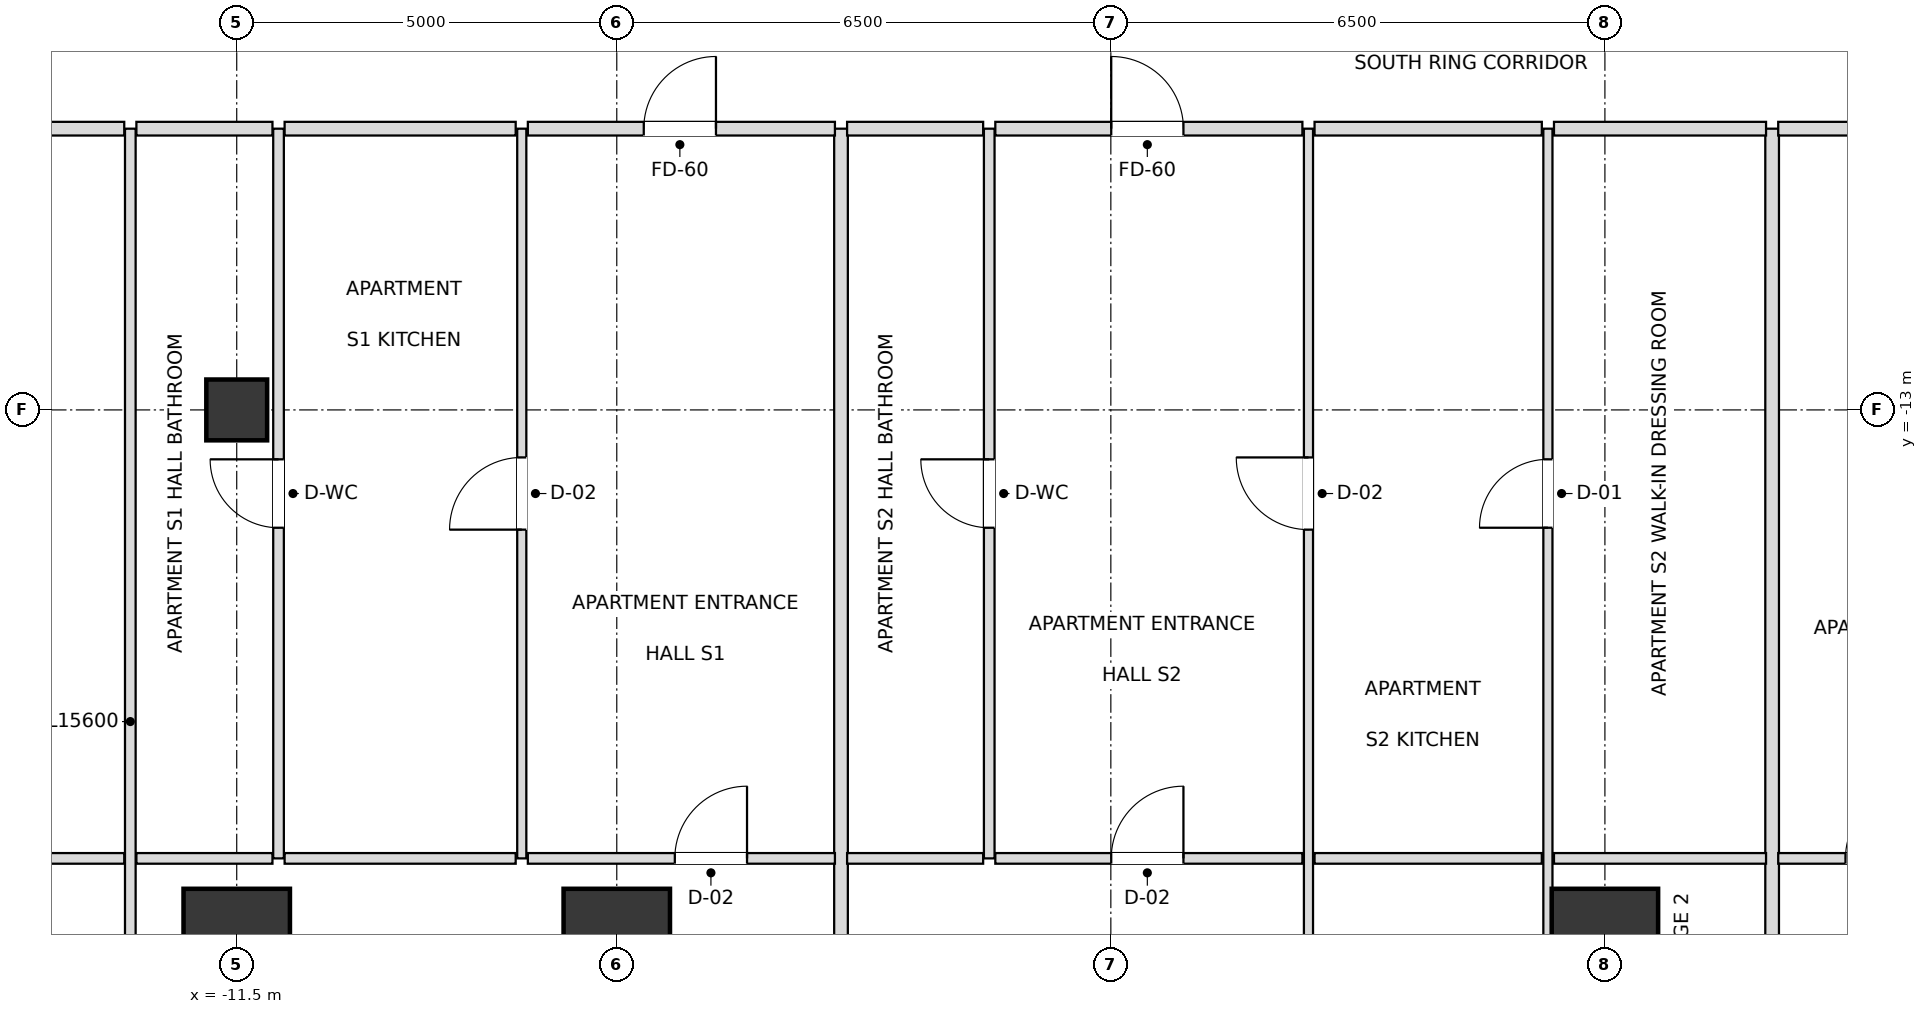
"""IFC4 building model, lengths in metres.
Left out: names, types, materials, properties, quantities, classifications, styles, units other than length and angle.
Written with IfcOpenShell. Run it as: python <this file> out.ifc"""

import sys

from ifc_helpers import new_model, si_unit, direction, frame, frame_2d, origin, origin_2d, place, context, subcontext, project, spatial, rectangle, extrude, element, fill, save


model = new_model("IFC4")
c1 = context("Model", 3, precision=1e-05, world=origin(), true_north=direction((0.0, 1.0)))
c2 = subcontext(c1, "Body", "Model", "MODEL_VIEW")
j1 = project(units=[si_unit("LENGTHUNIT", "METRE"), si_unit("PLANEANGLEUNIT", "RADIAN")], contexts=[c1])
p1 = place(None, origin())
s1 = spatial("IfcSite", under=j1, at=p1, CompositionType="ELEMENT")
p2 = place(p1, origin())
s2 = spatial("IfcBuilding", under=s1, at=p2, CompositionType="ELEMENT")
p3 = place(p2, frame((0.0, 0.0, 46.8)))
s3 = spatial("IfcBuildingStorey", under=s2, at=p3, CompositionType="ELEMENT", Elevation=46.8)
for number, where, z_axis, x_axis in (
    (1, (-11.5, -20.0, 0.0), (0.0, 0.0, 1.0), (1.0, 0.0, 0.0)),
    (2, (-6.5, -20.0, 0.0), (0.0, 0.0, 1.0), (1.0, 0.0, 0.0)),
    (3, (6.5, -20.0, 0.0), (0.0, 0.0, 1.0), (1.0, 0.0, 0.0)),
):
    element("IfcColumn", number, at=place(p3, frame(where, z_axis=z_axis, x_axis=x_axis)), inside=s3, PredefinedType="USERDEFINED", context=c2, shape_type="SweptSolid", body=[
        extrude(rectangle(XDim=1.4, YDim=1.4, at=origin_2d()), origin(), (0.0, 0.0, 1.0), 3.6),
    ])
p4 = place(p3, frame((-11.5, -13.0, 0.0), z_axis=(0.0, 0.0, 1.0), x_axis=(1.0, 0.0, 0.0)))
e4 = element("IfcColumn", 4, at=p4, inside=s3, PredefinedType="COLUMN", context=c2, shape_type="SweptSolid", body=[
    extrude(rectangle(XDim=0.8, YDim=0.8, at=origin_2d()), origin(), (0.0, 0.0, 1.0), 3.6),
])
p5 = place(p3, frame((-12.9, -24.9, 0.0), z_axis=(0.0, 0.0, 1.0), x_axis=(0.0, 1.0, 0.0)))
e5 = element("IfcWall", 5, at=p5, inside=s3, PredefinedType="PARTITIONING", context=c2, shape_type="SweptSolid", body=[
    extrude(rectangle(XDim=15.6, YDim=0.14, at=frame_2d((7.8, 0.0))), origin(), (0.0, 0.0, 1.0), 2.736),
])
p6 = place(p5, frame((2.55, 0.0, 0.0)))
e6 = element("IfcOpeningElement", 6, at=p6, cuts=e5, PredefinedType="OPENING", context=c2, shape_type="SweptSolid", body=[
    extrude(rectangle(XDim=0.9, YDim=2.1, at=frame_2d((0.45, 1.05))), frame((0.0, 0.08, 0.0), z_axis=(0.0, -1.0, 0.0), x_axis=(1.0, 0.0, 0.0)), (0.0, 0.0, 1.0), 0.16),
])
p7 = place(p3, frame((-10.95, -18.9, 0.0), z_axis=(0.0, 0.0, 1.0), x_axis=(0.0, 1.0, 0.0)))
e7 = element("IfcWall", 7, at=p7, inside=s3, PredefinedType="PARTITIONING", context=c2, shape_type="SweptSolid", body=[
    extrude(rectangle(XDim=9.6, YDim=0.14, at=frame_2d((4.8, 0.0))), origin(), (0.0, 0.0, 1.0), 2.816),
])
p8 = place(p7, frame((4.35, 0.0, 0.0)))
e8 = element("IfcOpeningElement", 8, at=p8, cuts=e7, PredefinedType="OPENING", context=c2, shape_type="SweptSolid", body=[
    extrude(rectangle(XDim=0.9, YDim=2.1, at=frame_2d((0.45, 1.05))), frame((0.0, 0.08, 0.0), z_axis=(0.0, -1.0, 0.0), x_axis=(1.0, 0.0, 0.0)), (0.0, 0.0, 1.0), 0.16),
])
p9 = place(p3, frame((-7.75, -18.9, 0.0), z_axis=(0.0, 0.0, 1.0), x_axis=(0.0, 1.0, 0.0)))
e9 = element("IfcWall", 9, at=p9, inside=s3, PredefinedType="PARTITIONING", context=c2, shape_type="SweptSolid", body=[
    extrude(rectangle(XDim=9.6, YDim=0.12, at=frame_2d((4.8, 0.0))), origin(), (0.0, 0.0, 1.0), 2.816),
])
p10 = place(p9, frame((4.325, 0.0, 0.0)))
e10 = element("IfcOpeningElement", 10, at=p10, cuts=e9, PredefinedType="OPENING", context=c2, shape_type="SweptSolid", body=[
    extrude(rectangle(XDim=0.95, YDim=2.1, at=frame_2d((0.475, 1.05))), frame((0.0, 0.07, 0.0), z_axis=(0.0, -1.0, 0.0), x_axis=(1.0, 0.0, 0.0)), (0.0, 0.0, 1.0), 0.14),
])
p11 = place(p3, frame((-3.55, -24.9, 0.0), z_axis=(0.0, 0.0, 1.0), x_axis=(0.0, 1.0, 0.0)))
e11 = element("IfcWall", 11, at=p11, inside=s3, PredefinedType="PARTITIONING", context=c2, shape_type="SweptSolid", body=[
    extrude(rectangle(XDim=15.6, YDim=0.18, at=frame_2d((7.8, 0.0))), origin(), (0.0, 0.0, 1.0), 2.816),
])
p12 = place(p3, frame((-1.6, -18.9, 0.0), z_axis=(0.0, 0.0, 1.0), x_axis=(0.0, 1.0, 0.0)))
e12 = element("IfcWall", 12, at=p12, inside=s3, PredefinedType="PARTITIONING", context=c2, shape_type="SweptSolid", body=[
    extrude(rectangle(XDim=9.6, YDim=0.14, at=frame_2d((4.8, 0.0))), origin(), (0.0, 0.0, 1.0), 2.948),
])
p13 = place(p12, frame((4.35, 0.0, 0.0)))
e13 = element("IfcOpeningElement", 13, at=p13, cuts=e12, PredefinedType="OPENING", context=c2, shape_type="SweptSolid", body=[
    extrude(rectangle(XDim=0.9, YDim=2.1, at=frame_2d((0.45, 1.05))), frame((0.0, 0.08, 0.0), z_axis=(0.0, -1.0, 0.0), x_axis=(1.0, 0.0, 0.0)), (0.0, 0.0, 1.0), 0.16),
])
p14 = place(p3, frame((2.6, -24.9, 0.0), z_axis=(0.0, 0.0, 1.0), x_axis=(0.0, 1.0, 0.0)))
e14 = element("IfcWall", 14, at=p14, inside=s3, PredefinedType="PARTITIONING", context=c2, shape_type="SweptSolid", body=[
    extrude(rectangle(XDim=15.6, YDim=0.12, at=frame_2d((7.8, 0.0))), origin(), (0.0, 0.0, 1.0), 2.816),
])
p15 = place(p14, frame((10.325, 0.0, 0.0)))
e15 = element("IfcOpeningElement", 15, at=p15, cuts=e14, PredefinedType="OPENING", context=c2, shape_type="SweptSolid", body=[
    extrude(rectangle(XDim=0.95, YDim=2.1, at=frame_2d((0.475, 1.05))), frame((0.0, 0.07, 0.0), z_axis=(0.0, -1.0, 0.0), x_axis=(1.0, 0.0, 0.0)), (0.0, 0.0, 1.0), 0.14),
])
p16 = place(p14, frame((2.55, 0.0, 0.0)))
e16 = element("IfcOpeningElement", 16, at=p16, cuts=e14, PredefinedType="OPENING", context=c2, shape_type="SweptSolid", body=[
    extrude(rectangle(XDim=0.9, YDim=2.1, at=frame_2d((0.45, 1.05))), frame((0.0, 0.07, 0.0), z_axis=(0.0, -1.0, 0.0), x_axis=(1.0, 0.0, 0.0)), (0.0, 0.0, 1.0), 0.14),
])
p17 = place(p3, frame((5.75, -24.9, 0.0), z_axis=(0.0, 0.0, 1.0), x_axis=(0.0, 1.0, 0.0)))
e17 = element("IfcWall", 17, at=p17, inside=s3, PredefinedType="PARTITIONING", context=c2, shape_type="SweptSolid", body=[
    extrude(rectangle(XDim=15.6, YDim=0.12, at=frame_2d((7.8, 0.0))), origin(), (0.0, 0.0, 1.0), 2.816),
])
p18 = place(p17, frame((10.35, 0.0, 0.0)))
e18 = element("IfcOpeningElement", 18, at=p18, cuts=e17, PredefinedType="OPENING", context=c2, shape_type="SweptSolid", body=[
    extrude(rectangle(XDim=0.9, YDim=2.1, at=frame_2d((0.45, 1.05))), frame((0.0, 0.07, 0.0), z_axis=(0.0, -1.0, 0.0), x_axis=(1.0, 0.0, 0.0)), (0.0, 0.0, 1.0), 0.14),
])
p19 = place(p17, frame((2.55, 0.0, 0.0)))
e19 = element("IfcOpeningElement", 19, at=p19, cuts=e17, PredefinedType="OPENING", context=c2, shape_type="SweptSolid", body=[
    extrude(rectangle(XDim=0.9, YDim=2.1, at=frame_2d((0.45, 1.05))), frame((0.0, 0.07, 0.0), z_axis=(0.0, -1.0, 0.0), x_axis=(1.0, 0.0, 0.0)), (0.0, 0.0, 1.0), 0.14),
])
p20 = place(p3, frame((8.7, -24.9, 0.0), z_axis=(0.0, 0.0, 1.0), x_axis=(0.0, 1.0, 0.0)))
e20 = element("IfcWall", 20, at=p20, inside=s3, PredefinedType="PARTITIONING", context=c2, shape_type="SweptSolid", body=[
    extrude(rectangle(XDim=15.6, YDim=0.18, at=frame_2d((7.8, 0.0))), origin(), (0.0, 0.0, 1.0), 2.816),
])
p21 = place(p3, frame((-18.32, -18.9, 0.0), z_axis=(0.0, 0.0, 1.0), x_axis=(1.0, 0.0, 0.0)))
e21 = element("IfcWall", 21, at=p21, inside=s3, PredefinedType="PARTITIONING", context=c2, shape_type="SweptSolid", body=[
    extrude(rectangle(XDim=5.34, YDim=0.14, at=frame_2d((2.67, 0.0))), origin(), (0.0, 0.0, 1.0), 2.736),
])
p22 = place(p21, frame((2.21, 0.0, 0.0)))
e22 = element("IfcOpeningElement", 22, at=p22, cuts=e21, PredefinedType="OPENING", context=c2, shape_type="SweptSolid", body=[
    extrude(rectangle(XDim=0.9, YDim=2.1, at=frame_2d((0.45, 1.05))), frame((0.0, 0.08, 0.0), z_axis=(0.0, -1.0, 0.0), x_axis=(1.0, 0.0, 0.0)), (0.0, 0.0, 1.0), 0.16),
])
p23 = place(p3, frame((-12.82, -18.9, 0.0), z_axis=(0.0, 0.0, 1.0), x_axis=(1.0, 0.0, 0.0)))
e23 = element("IfcWall", 23, at=p23, inside=s3, PredefinedType="PARTITIONING", context=c2, shape_type="SweptSolid", body=[
    extrude(rectangle(XDim=1.79, YDim=0.14, at=frame_2d((0.895, 0.0))), origin(), (0.0, 0.0, 1.0), 2.736),
])
p24 = place(p3, frame((-10.87, -18.9, 0.0), z_axis=(0.0, 0.0, 1.0), x_axis=(1.0, 0.0, 0.0)))
e24 = element("IfcWall", 24, at=p24, inside=s3, PredefinedType="PARTITIONING", context=c2, shape_type="SweptSolid", body=[
    extrude(rectangle(XDim=3.04, YDim=0.14, at=frame_2d((1.52, 0.0))), origin(), (0.0, 0.0, 1.0), 3.38),
])
p25 = place(p3, frame((-7.67, -18.9, 0.0), z_axis=(0.0, 0.0, 1.0), x_axis=(1.0, 0.0, 0.0)))
e25 = element("IfcWall", 25, at=p25, inside=s3, PredefinedType="PARTITIONING", context=c2, shape_type="SweptSolid", body=[
    extrude(rectangle(XDim=4.04, YDim=0.14, at=frame_2d((2.02, 0.0))), origin(), (0.0, 0.0, 1.0), 2.816),
])
p26 = place(p25, frame((1.934, 0.0, 0.0)))
e26 = element("IfcOpeningElement", 26, at=p26, cuts=e25, PredefinedType="OPENING", context=c2, shape_type="SweptSolid", body=[
    extrude(rectangle(XDim=0.95, YDim=2.1, at=frame_2d((0.475, 1.05))), frame((0.0, 0.08, 0.0), z_axis=(0.0, -1.0, 0.0), x_axis=(1.0, 0.0, 0.0)), (0.0, 0.0, 1.0), 0.16),
])
p27 = place(p3, frame((-3.47, -18.9, 0.0), z_axis=(0.0, 0.0, 1.0), x_axis=(1.0, 0.0, 0.0)))
e27 = element("IfcWall", 27, at=p27, inside=s3, PredefinedType="PARTITIONING", context=c2, shape_type="SweptSolid", body=[
    extrude(rectangle(XDim=1.79, YDim=0.14, at=frame_2d((0.895, 0.0))), origin(), (0.0, 0.0, 1.0), 3.38),
])
p28 = place(p3, frame((-1.52, -18.9, 0.0), z_axis=(0.0, 0.0, 1.0), x_axis=(1.0, 0.0, 0.0)))
e28 = element("IfcWall", 28, at=p28, inside=s3, PredefinedType="PARTITIONING", context=c2, shape_type="SweptSolid", body=[
    extrude(rectangle(XDim=4.04, YDim=0.14, at=frame_2d((2.02, 0.0))), origin(), (0.0, 0.0, 1.0), 3.38),
])
p29 = place(p28, frame((1.525, 0.0, 0.0)))
e29 = element("IfcOpeningElement", 29, at=p29, cuts=e28, PredefinedType="OPENING", context=c2, shape_type="SweptSolid", body=[
    extrude(rectangle(XDim=0.95, YDim=2.1, at=frame_2d((0.475, 1.05))), frame((0.0, 0.08, 0.0), z_axis=(0.0, -1.0, 0.0), x_axis=(1.0, 0.0, 0.0)), (0.0, 0.0, 1.0), 0.16),
])
p30 = place(p3, frame((2.68, -18.9, 0.0), z_axis=(0.0, 0.0, 1.0), x_axis=(1.0, 0.0, 0.0)))
e30 = element("IfcWall", 30, at=p30, inside=s3, PredefinedType="PARTITIONING", context=c2, shape_type="SweptSolid", body=[
    extrude(rectangle(XDim=2.99, YDim=0.14, at=frame_2d((1.495, 0.0))), origin(), (0.0, 0.0, 1.0), 3.38),
])
p31 = place(p3, frame((5.83, -18.9, 0.0), z_axis=(0.0, 0.0, 1.0), x_axis=(1.0, 0.0, 0.0)))
e31 = element("IfcWall", 31, at=p31, inside=s3, PredefinedType="PARTITIONING", context=c2, shape_type="SweptSolid", body=[
    extrude(rectangle(XDim=2.79, YDim=0.14, at=frame_2d((1.395, 0.0))), origin(), (0.0, 0.0, 1.0), 2.816),
])
p32 = place(p3, frame((8.78, -18.9, 0.0), z_axis=(0.0, 0.0, 1.0), x_axis=(1.0, 0.0, 0.0)))
e32 = element("IfcWall", 32, at=p32, inside=s3, PredefinedType="PARTITIONING", context=c2, shape_type="SweptSolid", body=[
    extrude(rectangle(XDim=3.74, YDim=0.14, at=frame_2d((1.87, 0.0))), origin(), (0.0, 0.0, 1.0), 2.736),
])
p33 = place(p32, frame((0.885, 0.0, 0.0)))
e33 = element("IfcOpeningElement", 33, at=p33, cuts=e32, PredefinedType="OPENING", context=c2, shape_type="SweptSolid", body=[
    extrude(rectangle(XDim=0.95, YDim=2.1, at=frame_2d((0.475, 1.05))), frame((0.0, 0.08, 0.0), z_axis=(0.0, -1.0, 0.0), x_axis=(1.0, 0.0, 0.0)), (0.0, 0.0, 1.0), 0.16),
])
p34 = place(p3, frame((-18.32, -9.3, 0.0), z_axis=(0.0, 0.0, 1.0), x_axis=(1.0, 0.0, 0.0)))
e34 = element("IfcWall", 34, at=p34, inside=s3, PredefinedType="PARTITIONING", context=c2, shape_type="SweptSolid", body=[
    extrude(rectangle(XDim=5.34, YDim=0.18, at=frame_2d((2.67, 0.0))), origin(), (0.0, 0.0, 1.0), 2.816),
])
p35 = place(p3, frame((-12.82, -9.3, 0.0), z_axis=(0.0, 0.0, 1.0), x_axis=(1.0, 0.0, 0.0)))
e35 = element("IfcWall", 35, at=p35, inside=s3, PredefinedType="PARTITIONING", context=c2, shape_type="SweptSolid", body=[
    extrude(rectangle(XDim=1.79, YDim=0.18, at=frame_2d((0.895, 0.0))), origin(), (0.0, 0.0, 1.0), 3.38),
])
p36 = place(p3, frame((-10.87, -9.3, 0.0), z_axis=(0.0, 0.0, 1.0), x_axis=(1.0, 0.0, 0.0)))
e36 = element("IfcWall", 36, at=p36, inside=s3, PredefinedType="PARTITIONING", context=c2, shape_type="SweptSolid", body=[
    extrude(rectangle(XDim=3.04, YDim=0.18, at=frame_2d((1.52, 0.0))), origin(), (0.0, 0.0, 1.0), 3.38),
])
p37 = place(p3, frame((-7.67, -9.3, 0.0), z_axis=(0.0, 0.0, 1.0), x_axis=(1.0, 0.0, 0.0)))
e37 = element("IfcWall", 37, at=p37, inside=s3, PredefinedType="PARTITIONING", context=c2, shape_type="SweptSolid", body=[
    extrude(rectangle(XDim=4.04, YDim=0.18, at=frame_2d((2.02, 0.0))), origin(), (0.0, 0.0, 1.0), 2.816),
])
p38 = place(p37, frame((1.525, 0.0, 0.0)))
e38 = element("IfcOpeningElement", 38, at=p38, cuts=e37, PredefinedType="OPENING", context=c2, shape_type="SweptSolid", body=[
    extrude(rectangle(XDim=0.95, YDim=2.15, at=frame_2d((0.475, 1.075))), frame((0.0, 0.1, 0.0), z_axis=(0.0, -1.0, 0.0), x_axis=(1.0, 0.0, 0.0)), (0.0, 0.0, 1.0), 0.2),
])
p39 = place(p3, frame((-3.47, -9.3, 0.0), z_axis=(0.0, 0.0, 1.0), x_axis=(1.0, 0.0, 0.0)))
e39 = element("IfcWall", 39, at=p39, inside=s3, PredefinedType="PARTITIONING", context=c2, shape_type="SweptSolid", body=[
    extrude(rectangle(XDim=1.79, YDim=0.18, at=frame_2d((0.895, 0.0))), origin(), (0.0, 0.0, 1.0), 3.38),
])
p40 = place(p3, frame((-1.52, -9.3, 0.0), z_axis=(0.0, 0.0, 1.0), x_axis=(1.0, 0.0, 0.0)))
e40 = element("IfcWall", 40, at=p40, inside=s3, PredefinedType="PARTITIONING", context=c2, shape_type="SweptSolid", body=[
    extrude(rectangle(XDim=4.04, YDim=0.18, at=frame_2d((2.02, 0.0))), origin(), (0.0, 0.0, 1.0), 3.38),
])
p41 = place(p40, frame((1.525, 0.0, 0.0)))
e41 = element("IfcOpeningElement", 41, at=p41, cuts=e40, PredefinedType="OPENING", context=c2, shape_type="SweptSolid", body=[
    extrude(rectangle(XDim=0.95, YDim=2.15, at=frame_2d((0.475, 1.075))), frame((0.0, 0.1, 0.0), z_axis=(0.0, -1.0, 0.0), x_axis=(1.0, 0.0, 0.0)), (0.0, 0.0, 1.0), 0.2),
])
p42 = place(p3, frame((2.68, -9.3, 0.0), z_axis=(0.0, 0.0, 1.0), x_axis=(1.0, 0.0, 0.0)))
e42 = element("IfcWall", 42, at=p42, inside=s3, PredefinedType="PARTITIONING", context=c2, shape_type="SweptSolid", body=[
    extrude(rectangle(XDim=2.99, YDim=0.18, at=frame_2d((1.495, 0.0))), origin(), (0.0, 0.0, 1.0), 3.38),
])
p43 = place(p3, frame((5.83, -9.3, 0.0), z_axis=(0.0, 0.0, 1.0), x_axis=(1.0, 0.0, 0.0)))
e43 = element("IfcWall", 43, at=p43, inside=s3, PredefinedType="PARTITIONING", context=c2, shape_type="SweptSolid", body=[
    extrude(rectangle(XDim=2.79, YDim=0.18, at=frame_2d((1.395, 0.0))), origin(), (0.0, 0.0, 1.0), 2.816),
])
p44 = place(p3, frame((8.78, -9.3, 0.0), z_axis=(0.0, 0.0, 1.0), x_axis=(1.0, 0.0, 0.0)))
e44 = element("IfcWall", 44, at=p44, inside=s3, PredefinedType="PARTITIONING", context=c2, shape_type="SweptSolid", body=[
    extrude(rectangle(XDim=5.19, YDim=0.18, at=frame_2d((2.595, 0.0))), origin(), (0.0, 0.0, 1.0), 3.38),
])
p45 = place(p44, frame((0.995, 0.0, 0.0)))
e45 = element("IfcOpeningElement", 45, at=p45, cuts=e44, PredefinedType="OPENING", context=c2, shape_type="SweptSolid", body=[
    extrude(rectangle(XDim=0.95, YDim=2.15, at=frame_2d((0.475, 1.075))), frame((0.0, 0.1, 0.0), z_axis=(0.0, -1.0, 0.0), x_axis=(1.0, 0.0, 0.0)), (0.0, 0.0, 1.0), 0.2),
])
p46 = place(p38, origin())
e46 = element("IfcDoor", 46, at=p46, inside=s3, OperationType="SINGLE_SWING_RIGHT", PredefinedType="DOOR", context=c2, shape_type="SweptSolid", body=[
    extrude(rectangle(XDim=0.95, YDim=2.15, at=frame_2d((0.475, 1.075))), frame((0.0, 0.025, 0.0), z_axis=(0.0, -1.0, 0.0), x_axis=(1.0, 0.0, 0.0)), (0.0, 0.0, 1.0), 0.05),
])
fill(e38, e46)
p47 = place(p10, origin())
e47 = element("IfcDoor", 47, at=p47, inside=s3, OperationType="SINGLE_SWING_LEFT", PredefinedType="DOOR", context=c2, shape_type="SweptSolid", body=[
    extrude(rectangle(XDim=0.95, YDim=2.1, at=frame_2d((0.475, 1.05))), frame((0.0, 0.025, 0.0), z_axis=(0.0, -1.0, 0.0), x_axis=(1.0, 0.0, 0.0)), (0.0, 0.0, 1.0), 0.05),
])
fill(e10, e47)
p48 = place(p8, origin())
e48 = element("IfcDoor", 48, at=p48, inside=s3, OperationType="SINGLE_SWING_RIGHT", PredefinedType="DOOR", context=c2, shape_type="SweptSolid", body=[
    extrude(rectangle(XDim=0.9, YDim=2.1, at=frame_2d((0.45, 1.05))), frame((0.0, 0.025, 0.0), z_axis=(0.0, -1.0, 0.0), x_axis=(1.0, 0.0, 0.0)), (0.0, 0.0, 1.0), 0.05),
])
fill(e8, e48)
p49 = place(p26, origin())
e49 = element("IfcDoor", 49, at=p49, inside=s3, OperationType="SINGLE_SWING_RIGHT", PredefinedType="DOOR", context=c2, shape_type="SweptSolid", body=[
    extrude(rectangle(XDim=0.95, YDim=2.1, at=frame_2d((0.475, 1.05))), frame((0.0, 0.025, 0.0), z_axis=(0.0, -1.0, 0.0), x_axis=(1.0, 0.0, 0.0)), (0.0, 0.0, 1.0), 0.05),
])
fill(e26, e49)
p50 = place(p13, origin())
e50 = element("IfcDoor", 50, at=p50, inside=s3, OperationType="SINGLE_SWING_RIGHT", PredefinedType="DOOR", context=c2, shape_type="SweptSolid", body=[
    extrude(rectangle(XDim=0.9, YDim=2.1, at=frame_2d((0.45, 1.05))), frame((0.0, 0.025, 0.0), z_axis=(0.0, -1.0, 0.0), x_axis=(1.0, 0.0, 0.0)), (0.0, 0.0, 1.0), 0.05),
])
fill(e13, e50)
p51 = place(p41, origin())
e51 = element("IfcDoor", 51, at=p51, inside=s3, OperationType="SINGLE_SWING_LEFT", PredefinedType="DOOR", context=c2, shape_type="SweptSolid", body=[
    extrude(rectangle(XDim=0.95, YDim=2.15, at=frame_2d((0.475, 1.075))), frame((0.0, 0.025, 0.0), z_axis=(0.0, -1.0, 0.0), x_axis=(1.0, 0.0, 0.0)), (0.0, 0.0, 1.0), 0.05),
])
fill(e41, e51)
p52 = place(p15, origin())
e52 = element("IfcDoor", 52, at=p52, inside=s3, OperationType="SINGLE_SWING_RIGHT", PredefinedType="DOOR", context=c2, shape_type="SweptSolid", body=[
    extrude(rectangle(XDim=0.95, YDim=2.1, at=frame_2d((0.475, 1.05))), frame((0.0, 0.025, 0.0), z_axis=(0.0, -1.0, 0.0), x_axis=(1.0, 0.0, 0.0)), (0.0, 0.0, 1.0), 0.05),
])
fill(e15, e52)
p53 = place(p18, origin())
e53 = element("IfcDoor", 53, at=p53, inside=s3, OperationType="SINGLE_SWING_LEFT", PredefinedType="DOOR", context=c2, shape_type="SweptSolid", body=[
    extrude(rectangle(XDim=0.9, YDim=2.1, at=frame_2d((0.45, 1.05))), frame((0.0, 0.025, 0.0), z_axis=(0.0, -1.0, 0.0), x_axis=(1.0, 0.0, 0.0)), (0.0, 0.0, 1.0), 0.05),
])
fill(e18, e53)
p54 = place(p29, origin())
e54 = element("IfcDoor", 54, at=p54, inside=s3, OperationType="SINGLE_SWING_RIGHT", PredefinedType="DOOR", context=c2, shape_type="SweptSolid", body=[
    extrude(rectangle(XDim=0.95, YDim=2.1, at=frame_2d((0.475, 1.05))), frame((0.0, 0.025, 0.0), z_axis=(0.0, -1.0, 0.0), x_axis=(1.0, 0.0, 0.0)), (0.0, 0.0, 1.0), 0.05),
])
fill(e29, e54)
p55 = place(p33, origin())
e55 = element("IfcDoor", 55, at=p55, inside=s3, OperationType="SINGLE_SWING_RIGHT", PredefinedType="DOOR", context=c2, shape_type="SweptSolid", body=[
    extrude(rectangle(XDim=0.95, YDim=2.1, at=frame_2d((0.475, 1.05))), frame((0.0, 0.025, 0.0), z_axis=(0.0, -1.0, 0.0), x_axis=(1.0, 0.0, 0.0)), (0.0, 0.0, 1.0), 0.05),
])
fill(e33, e55)
save(model, sys.argv[1])
